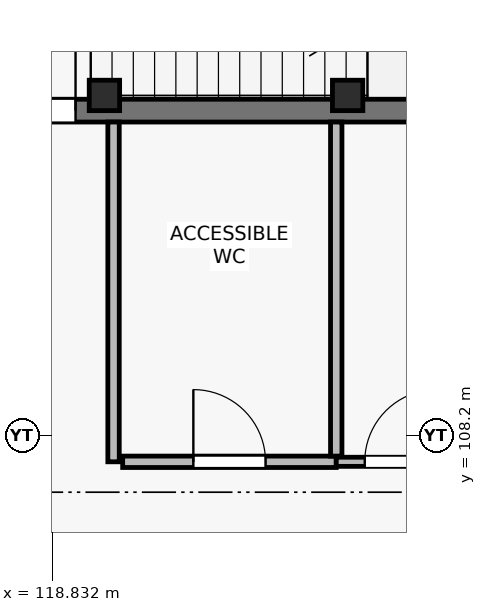
"""IFC4 building model, lengths in metres.
Left out: names, types, materials, properties, quantities, classifications, styles, units other than length and angle.
Written with IfcOpenShell. Run it as: python <this file> out.ifc"""

import sys

from ifc_helpers import new_model, si_unit, direction, frame, frame_2d, origin, origin_2d, place, context, subcontext, project, spatial, rectangle, extrude, element, fill, save


model = new_model("IFC4")
c1 = context("Model", 3, precision=1e-05, world=origin(), true_north=direction((0.0, 1.0)))
c2 = subcontext(c1, "Body", "Model", "MODEL_VIEW")
j1 = project(units=[si_unit("LENGTHUNIT", "METRE"), si_unit("PLANEANGLEUNIT", "RADIAN")], contexts=[c1])
p1 = place(None, origin())
s1 = spatial("IfcSite", under=j1, at=p1, CompositionType="ELEMENT")
p2 = place(p1, origin())
s2 = spatial("IfcBuilding", under=s1, at=p2, CompositionType="ELEMENT")
p3 = place(p2, origin())
s3 = spatial("IfcBuildingStorey", under=s2, at=p3, CompositionType="ELEMENT", Elevation=0.0)
for number, where, z_axis, x_axis in (
    (1, (119.52, 112.67, 0.0), (0.0, 0.0, 1.0), (1.0, 0.0, 0.0)),
    (2, (122.72, 112.67, 0.0), (0.0, 0.0, 1.0), (1.0, 0.0, 0.0)),
):
    element("IfcColumn", number, at=place(p3, frame(where, z_axis=z_axis, x_axis=x_axis)), inside=s3, PredefinedType="COLUMN", context=c2, shape_type="SweptSolid", body=[
        extrude(rectangle(XDim=0.4, YDim=0.4, at=origin_2d()), origin(), (0.0, 0.0, 1.0), 4.8),
    ])
p4 = place(p3, frame((117.24, 112.47, 0.0), z_axis=(0.0, 0.0, 1.0), x_axis=(1.0, 0.0, 0.0)))
e3 = element("IfcWall", 3, at=p4, inside=s3, PredefinedType="SHEAR", context=c2, shape_type="SweptSolid", body=[
    extrude(rectangle(XDim=7.5, YDim=0.3, at=frame_2d((3.75, 0.0))), origin(), (0.0, 0.0, 1.0), 4.54),
])
p5 = place(p4, frame((0.5, 0.0, 0.0)))
e4 = element("IfcOpeningElement", 4, at=p5, cuts=e3, PredefinedType="OPENING", context=c2, shape_type="SweptSolid", body=[
    extrude(rectangle(XDim=1.4, YDim=2.2, at=frame_2d((0.7, 1.1))), frame((0.0, 0.16, 0.0), z_axis=(0.0, -1.0, 0.0), x_axis=(1.0, 0.0, 0.0)), (0.0, 0.0, 1.0), 0.32),
])
p6 = place(p3, frame((119.64, 107.85, 0.0), z_axis=(0.0, 0.0, 1.0), x_axis=(0.0, 1.0, 0.0)))
e5 = element("IfcWall", 5, at=p6, inside=s3, PredefinedType="PARTITIONING", context=c2, shape_type="SweptSolid", body=[
    extrude(rectangle(XDim=4.47, YDim=0.15, at=frame_2d((2.235, 0.0))), origin(), (0.0, 0.0, 1.0), 4.54),
])
p7 = place(p3, frame((119.76, 107.85, 0.0), z_axis=(0.0, 0.0, 1.0), x_axis=(1.0, 0.0, 0.0)))
e6 = element("IfcWall", 6, at=p7, inside=s3, PredefinedType="PARTITIONING", context=c2, shape_type="SweptSolid", body=[
    extrude(rectangle(XDim=2.81, YDim=0.15, at=frame_2d((1.405, 0.0))), origin(), (0.0, 0.0, 1.0), 4.04),
])
p8 = place(p7, frame((0.93, 0.0, 0.0)))
e7 = element("IfcOpeningElement", 7, at=p8, cuts=e6, PredefinedType="OPENING", context=c2, shape_type="SweptSolid", body=[
    extrude(rectangle(XDim=0.95, YDim=2.1, at=frame_2d((0.475, 1.05))), frame((0.0, 0.085, 0.0), z_axis=(0.0, -1.0, 0.0), x_axis=(1.0, 0.0, 0.0)), (0.0, 0.0, 1.0), 0.17),
])
p9 = place(p3, frame((122.57, 107.85, 0.0), z_axis=(0.0, 0.0, 1.0), x_axis=(1.0, 0.0, 0.0)))
e8 = element("IfcWall", 8, at=p9, inside=s3, PredefinedType="PARTITIONING", context=c2, shape_type="SweptSolid", body=[
    extrude(rectangle(XDim=3.4, YDim=0.12, at=frame_2d((1.7, 0.0))), origin(), (0.0, 0.0, 1.0), 4.04),
])
p10 = place(p9, frame((0.375, 0.0, 0.0)))
e9 = element("IfcOpeningElement", 9, at=p10, cuts=e8, PredefinedType="OPENING", context=c2, shape_type="SweptSolid", body=[
    extrude(rectangle(XDim=0.95, YDim=2.1, at=frame_2d((0.475, 1.05))), frame((0.0, 0.07, 0.0), z_axis=(0.0, -1.0, 0.0), x_axis=(1.0, 0.0, 0.0)), (0.0, 0.0, 1.0), 0.14),
])
p11 = place(p3, frame((122.57, 107.925, 0.0), z_axis=(0.0, 0.0, 1.0), x_axis=(0.0, 1.0, 0.0)))
e10 = element("IfcWall", 10, at=p11, inside=s3, PredefinedType="PARTITIONING", context=c2, shape_type="SweptSolid", body=[
    extrude(rectangle(XDim=4.395, YDim=0.15, at=frame_2d((2.198, 0.0))), origin(), (0.0, 0.0, 1.0), 4.54),
])
p12 = place(p5, origin())
e11 = element("IfcDoor", 11, at=p12, inside=s3, OperationType="SINGLE_SWING_RIGHT", PredefinedType="DOOR", context=c2, shape_type="SweptSolid", body=[
    extrude(rectangle(XDim=1.4, YDim=2.2, at=frame_2d((0.7, 1.1))), frame((0.0, 0.025, 0.0), z_axis=(0.0, -1.0, 0.0), x_axis=(1.0, 0.0, 0.0)), (0.0, 0.0, 1.0), 0.05),
])
fill(e4, e11)
p13 = place(p8, origin())
e12 = element("IfcDoor", 12, at=p13, inside=s3, OperationType="SINGLE_SWING_LEFT", PredefinedType="DOOR", context=c2, shape_type="SweptSolid", body=[
    extrude(rectangle(XDim=0.95, YDim=2.1, at=frame_2d((0.475, 1.05))), frame((0.0, 0.025, 0.0), z_axis=(0.0, -1.0, 0.0), x_axis=(1.0, 0.0, 0.0)), (0.0, 0.0, 1.0), 0.05),
])
fill(e7, e12)
p14 = place(p10, origin())
e13 = element("IfcDoor", 13, at=p14, inside=s3, OperationType="SINGLE_SWING_RIGHT", PredefinedType="DOOR", context=c2, shape_type="SweptSolid", body=[
    extrude(rectangle(XDim=0.95, YDim=2.1, at=frame_2d((0.475, 1.05))), frame((0.0, 0.025, 0.0), z_axis=(0.0, -1.0, 0.0), x_axis=(1.0, 0.0, 0.0)), (0.0, 0.0, 1.0), 0.05),
])
fill(e9, e13)
save(model, sys.argv[1])
